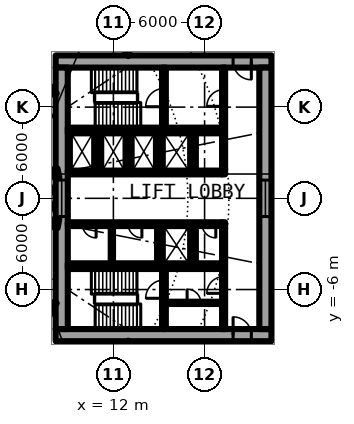
"""IFC4 building model, lengths in metres.
Left out: names, types, materials, properties, quantities, classifications, styles, units other than length and angle.
Written with IfcOpenShell. Run it as: python <this file> out.ifc"""

import sys

from ifc_helpers import new_model, si_unit, direction, frame, frame_2d, origin, origin_2d, place, context, subcontext, project, spatial, rectangle, i_section, extrude, element, fill, save


model = new_model("IFC4")
c1 = context("Model", 3, precision=1e-05, world=origin(), true_north=direction((0.0, 1.0)))
c2 = subcontext(c1, "Body", "Model", "MODEL_VIEW")
j1 = project(units=[si_unit("LENGTHUNIT", "METRE"), si_unit("PLANEANGLEUNIT", "RADIAN")], contexts=[c1])
p1 = place(None, origin())
s1 = spatial("IfcSite", under=j1, at=p1, CompositionType="ELEMENT")
p2 = place(p1, origin())
s2 = spatial("IfcBuilding", under=s1, at=p2, CompositionType="ELEMENT")
p3 = place(p2, frame((0.0, 0.0, 5.4)))
s3 = spatial("IfcBuildingStorey", under=s2, at=p3, CompositionType="ELEMENT", Elevation=5.4)
for number, where, z_axis, x_axis in (
    (1, (8.239, 1.639, 0.0), (0.0, 0.0, 1.0), (0.981, 0.195, 0.0)),
    (2, (8.239, -1.639, 0.0), (0.0, 0.0, 1.0), (0.981, -0.195, 0.0)),
):
    element("IfcColumn", number, at=place(p3, frame(where, z_axis=z_axis, x_axis=x_axis)), inside=s3, PredefinedType="COLUMN", context=c2, shape_type="SweptSolid", body=[
        extrude(i_section(OverallWidth=0.3, OverallDepth=0.6, WebThickness=0.015, FlangeThickness=0.03, FilletRadius=0.027, at=origin_2d()), origin(), (0.0, 0.0, 1.0), 4.2),
    ])
p4 = place(p3, frame((22.4, 9.0, 0.0), z_axis=(0.0, 0.0, 1.0), x_axis=(-1.0, 0.0, 0.0)))
e3 = element("IfcWall", 3, at=p4, inside=s3, PredefinedType="SHEAR", context=c2, shape_type="SweptSolid", body=[
    extrude(rectangle(XDim=14.2, YDim=0.8, at=frame_2d((7.1, 0.0))), origin(), (0.0, 0.0, 1.0), 4.2),
])
p5 = place(p4, frame((1.325, 0.0, 0.0)))
e4 = element("IfcOpeningElement", 4, at=p5, cuts=e3, PredefinedType="OPENING", context=c2, shape_type="SweptSolid", body=[
    extrude(rectangle(XDim=1.2, YDim=2.3, at=frame_2d((0.6, 1.15))), frame((0.0, 0.41, 0.0), z_axis=(0.0, -1.0, 0.0), x_axis=(1.0, 0.0, 0.0)), (0.0, 0.0, 1.0), 0.82),
])
p6 = place(p3, frame((8.2, -9.0, 0.0), z_axis=(0.0, 0.0, 1.0), x_axis=(1.0, 0.0, 0.0)))
e5 = element("IfcWall", 5, at=p6, inside=s3, PredefinedType="SHEAR", context=c2, shape_type="SweptSolid", body=[
    extrude(rectangle(XDim=14.2, YDim=0.8, at=frame_2d((7.1, 0.0))), origin(), (0.0, 0.0, 1.0), 4.2),
])
p7 = place(p6, frame((11.675, 0.0, 0.0)))
e6 = element("IfcOpeningElement", 6, at=p7, cuts=e5, PredefinedType="OPENING", context=c2, shape_type="SweptSolid", body=[
    extrude(rectangle(XDim=1.2, YDim=2.3, at=frame_2d((0.6, 1.15))), frame((0.0, 0.41, 0.0), z_axis=(0.0, -1.0, 0.0), x_axis=(1.0, 0.0, 0.0)), (0.0, 0.0, 1.0), 0.82),
])
p8 = place(p3, frame((22.0, -8.6, 0.0), z_axis=(0.0, 0.0, 1.0), x_axis=(0.0, 1.0, 0.0)))
e7 = element("IfcWall", 7, at=p8, inside=s3, PredefinedType="SHEAR", context=c2, shape_type="SweptSolid", body=[
    extrude(rectangle(XDim=17.2, YDim=0.8, at=frame_2d((8.6, 0.0))), origin(), (0.0, 0.0, 1.0), 4.2),
])
p9 = place(p8, frame((7.4, 0.0, 0.1)))
e8 = element("IfcOpeningElement", 8, at=p9, cuts=e7, PredefinedType="OPENING", context=c2, shape_type="SweptSolid", body=[
    extrude(rectangle(XDim=2.4, YDim=2.2, at=frame_2d((1.2, 1.1))), frame((0.0, 0.41, 0.0), z_axis=(0.0, -1.0, 0.0), x_axis=(1.0, 0.0, 0.0)), (0.0, 0.0, 1.0), 0.82),
])
p10 = place(p3, frame((8.6, -8.6, 0.0), z_axis=(0.0, 0.0, 1.0), x_axis=(0.0, 1.0, 0.0)))
e9 = element("IfcWall", 9, at=p10, inside=s3, PredefinedType="SHEAR", context=c2, shape_type="SweptSolid", body=[
    extrude(rectangle(XDim=17.2, YDim=0.8, at=frame_2d((8.6, 0.0))), origin(), (0.0, 0.0, 1.0), 4.2),
])
p11 = place(p10, frame((7.4, 0.0, 0.1)))
e10 = element("IfcOpeningElement", 10, at=p11, cuts=e9, PredefinedType="OPENING", context=c2, shape_type="SweptSolid", body=[
    extrude(rectangle(XDim=2.4, YDim=2.2, at=frame_2d((1.2, 1.1))), frame((0.0, 0.41, 0.0), z_axis=(0.0, -1.0, 0.0), x_axis=(1.0, 0.0, 0.0)), (0.0, 0.0, 1.0), 0.82),
])
p12 = place(p3, frame((9.0, 1.7, 0.0), z_axis=(0.0, 0.0, 1.0), x_axis=(1.0, 0.0, 0.0)))
e11 = element("IfcWall", 11, at=p12, inside=s3, PredefinedType="SHEAR", context=c2, shape_type="SweptSolid", body=[
    extrude(rectangle(XDim=10.15, YDim=0.25, at=frame_2d((5.075, 0.0))), origin(), (0.0, 0.0, 1.0), 4.2),
])
p13 = place(p12, frame((0.387, 0.0, 0.0)))
e12 = element("IfcOpeningElement", 12, at=p13, cuts=e11, PredefinedType="OPENING", context=c2, shape_type="SweptSolid", body=[
    extrude(rectangle(XDim=1.1, YDim=2.3, at=frame_2d((0.55, 1.15))), frame((0.0, 0.135, 0.0), z_axis=(0.0, -1.0, 0.0), x_axis=(1.0, 0.0, 0.0)), (0.0, 0.0, 1.0), 0.27),
])
p14 = place(p12, frame((2.45, 0.0, 0.0)))
e13 = element("IfcOpeningElement", 13, at=p14, cuts=e11, PredefinedType="OPENING", context=c2, shape_type="SweptSolid", body=[
    extrude(rectangle(XDim=1.1, YDim=2.3, at=frame_2d((0.55, 1.15))), frame((0.0, 0.135, 0.0), z_axis=(0.0, -1.0, 0.0), x_axis=(1.0, 0.0, 0.0)), (0.0, 0.0, 1.0), 0.27),
])
p15 = place(p12, frame((4.45, 0.0, 0.0)))
e14 = element("IfcOpeningElement", 14, at=p15, cuts=e11, PredefinedType="OPENING", context=c2, shape_type="SweptSolid", body=[
    extrude(rectangle(XDim=1.1, YDim=2.3, at=frame_2d((0.55, 1.15))), frame((0.0, 0.135, 0.0), z_axis=(0.0, -1.0, 0.0), x_axis=(1.0, 0.0, 0.0)), (0.0, 0.0, 1.0), 0.27),
])
p16 = place(p3, frame((9.0, 4.462, 0.0), z_axis=(0.0, 0.0, 1.0), x_axis=(1.0, 0.0, 0.0)))
e15 = element("IfcWall", 15, at=p16, inside=s3, PredefinedType="SHEAR", context=c2, shape_type="SweptSolid", body=[
    extrude(rectangle(XDim=10.15, YDim=0.375, at=frame_2d((5.075, 0.0))), origin(), (0.0, 0.0, 1.0), 4.2),
])
p17 = place(p16, frame((6.6, 0.0, 0.0)))
e16 = element("IfcOpeningElement", 16, at=p17, cuts=e15, PredefinedType="OPENING", context=c2, shape_type="SweptSolid", body=[
    extrude(rectangle(XDim=1.1, YDim=2.3, at=frame_2d((0.55, 1.15))), frame((0.0, 0.198, 0.0), z_axis=(0.0, -1.0, 0.0), x_axis=(1.0, 0.0, 0.0)), (0.0, 0.0, 1.0), 0.395),
])
p18 = place(p3, frame((15.325, 4.65, 0.0), z_axis=(0.0, 0.0, 1.0), x_axis=(0.0, 1.0, 0.0)))
e17 = element("IfcWall", 17, at=p18, inside=s3, PredefinedType="SHEAR", context=c2, shape_type="SweptSolid", body=[
    extrude(rectangle(XDim=3.95, YDim=0.25, at=frame_2d((1.975, 0.0))), origin(), (0.0, 0.0, 1.0), 4.2),
])
p19 = place(p18, frame((1.375, 0.0, 0.0)))
e18 = element("IfcOpeningElement", 18, at=p19, cuts=e17, PredefinedType="OPENING", context=c2, shape_type="SweptSolid", body=[
    extrude(rectangle(XDim=1.2, YDim=2.3, at=frame_2d((0.6, 1.15))), frame((0.0, 0.135, 0.0), z_axis=(0.0, -1.0, 0.0), x_axis=(1.0, 0.0, 0.0)), (0.0, 0.0, 1.0), 0.27),
])
for number, where, z_axis, x_axis in (
    (19, (15.0, 1.825, 0.0), (0.0, 0.0, 1.0), (0.0, 1.0, 0.0)),
    (20, (17.3, 1.825, 0.0), (0.0, 0.0, 1.0), (0.0, 1.0, 0.0)),
):
    element("IfcWall", number, at=place(p3, frame(where, z_axis=z_axis, x_axis=x_axis)), inside=s3, PredefinedType="SOLIDWALL", context=c2, shape_type="SweptSolid", body=[
        extrude(rectangle(XDim=2.45, YDim=0.25, at=frame_2d((1.225, 0.0))), origin(), (0.0, 0.0, 1.0), 3.7),
    ])
p20 = place(p3, frame((19.25, 1.575, 0.0), z_axis=(0.0, 0.0, 1.0), x_axis=(0.0, 1.0, 0.0)))
e21 = element("IfcWall", 21, at=p20, inside=s3, PredefinedType="SOLIDWALL", context=c2, shape_type="SweptSolid", body=[
    extrude(rectangle(XDim=7.025, YDim=0.2, at=frame_2d((3.513, 0.0))), origin(), (0.0, 0.0, 1.0), 3.7),
])
p21 = place(p20, frame((4.475, 0.0, 0.0)))
e22 = element("IfcOpeningElement", 22, at=p21, cuts=e21, PredefinedType="OPENING", context=c2, shape_type="SweptSolid", body=[
    extrude(rectangle(XDim=1.1, YDim=2.3, at=frame_2d((0.55, 1.15))), frame((0.0, 0.11, 0.0), z_axis=(0.0, -1.0, 0.0), x_axis=(1.0, 0.0, 0.0)), (0.0, 0.0, 1.0), 0.22),
])
p22 = place(p3, frame((19.15, -1.7, 0.0), z_axis=(0.0, 0.0, 1.0), x_axis=(-1.0, 0.0, 0.0)))
e23 = element("IfcWall", 23, at=p22, inside=s3, PredefinedType="SHEAR", context=c2, shape_type="SweptSolid", body=[
    extrude(rectangle(XDim=10.15, YDim=0.25, at=frame_2d((5.075, 0.0))), origin(), (0.0, 0.0, 1.0), 4.2),
])
p23 = place(p22, frame((2.45, 0.0, 0.0)))
e24 = element("IfcOpeningElement", 24, at=p23, cuts=e23, PredefinedType="OPENING", context=c2, shape_type="SweptSolid", body=[
    extrude(rectangle(XDim=1.1, YDim=2.3, at=frame_2d((0.55, 1.15))), frame((0.0, 0.135, 0.0), z_axis=(0.0, -1.0, 0.0), x_axis=(1.0, 0.0, 0.0)), (0.0, 0.0, 1.0), 0.27),
])
p24 = place(p22, frame((8.288, 0.0, 0.0)))
e25 = element("IfcOpeningElement", 25, at=p24, cuts=e23, PredefinedType="OPENING", context=c2, shape_type="SweptSolid", body=[
    extrude(rectangle(XDim=0.9, YDim=2.3, at=frame_2d((0.45, 1.15))), frame((0.0, 0.135, 0.0), z_axis=(0.0, -1.0, 0.0), x_axis=(1.0, 0.0, 0.0)), (0.0, 0.0, 1.0), 0.27),
])
p25 = place(p22, frame((5.275, 0.0, 0.0)))
e26 = element("IfcOpeningElement", 26, at=p25, cuts=e23, PredefinedType="OPENING", context=c2, shape_type="SweptSolid", body=[
    extrude(rectangle(XDim=0.9, YDim=2.3, at=frame_2d((0.45, 1.15))), frame((0.0, 0.135, 0.0), z_axis=(0.0, -1.0, 0.0), x_axis=(1.0, 0.0, 0.0)), (0.0, 0.0, 1.0), 0.27),
])
p26 = place(p22, frame((0.413, 0.0, 0.0)))
e27 = element("IfcOpeningElement", 27, at=p26, cuts=e23, PredefinedType="OPENING", context=c2, shape_type="SweptSolid", body=[
    extrude(rectangle(XDim=0.9, YDim=2.3, at=frame_2d((0.45, 1.15))), frame((0.0, 0.135, 0.0), z_axis=(0.0, -1.0, 0.0), x_axis=(1.0, 0.0, 0.0)), (0.0, 0.0, 1.0), 0.27),
])
p27 = place(p3, frame((9.0, -4.462, 0.0), z_axis=(0.0, 0.0, 1.0), x_axis=(1.0, 0.0, 0.0)))
e28 = element("IfcWall", 28, at=p27, inside=s3, PredefinedType="SHEAR", context=c2, shape_type="SweptSolid", body=[
    extrude(rectangle(XDim=10.15, YDim=0.375, at=frame_2d((5.075, 0.0))), origin(), (0.0, 0.0, 1.0), 4.2),
])
p28 = place(p3, frame((15.325, -8.6, 0.0), z_axis=(0.0, 0.0, 1.0), x_axis=(0.0, 1.0, 0.0)))
e29 = element("IfcWall", 29, at=p28, inside=s3, PredefinedType="SHEAR", context=c2, shape_type="SweptSolid", body=[
    extrude(rectangle(XDim=3.95, YDim=0.25, at=frame_2d((1.975, 0.0))), origin(), (0.0, 0.0, 1.0), 4.2),
])
p29 = place(p28, frame((2.025, 0.0, 0.0)))
e30 = element("IfcOpeningElement", 30, at=p29, cuts=e29, PredefinedType="OPENING", context=c2, shape_type="SweptSolid", body=[
    extrude(rectangle(XDim=1.2, YDim=2.3, at=frame_2d((0.6, 1.15))), frame((0.0, 0.135, 0.0), z_axis=(0.0, -1.0, 0.0), x_axis=(1.0, 0.0, 0.0)), (0.0, 0.0, 1.0), 0.27),
])
for number, where, z_axis, x_axis in (
    (31, (15.0, -1.825, 0.0), (0.0, 0.0, 1.0), (0.0, -1.0, 0.0)),
    (32, (17.3, -1.825, 0.0), (0.0, 0.0, 1.0), (0.0, -1.0, 0.0)),
):
    element("IfcWall", number, at=place(p3, frame(where, z_axis=z_axis, x_axis=x_axis)), inside=s3, PredefinedType="SOLIDWALL", context=c2, shape_type="SweptSolid", body=[
        extrude(rectangle(XDim=2.45, YDim=0.25, at=frame_2d((1.225, 0.0))), origin(), (0.0, 0.0, 1.0), 3.7),
    ])
p30 = place(p3, frame((19.25, -8.6, 0.0), z_axis=(0.0, 0.0, 1.0), x_axis=(0.0, 1.0, 0.0)))
e33 = element("IfcWall", 33, at=p30, inside=s3, PredefinedType="SOLIDWALL", context=c2, shape_type="SweptSolid", body=[
    extrude(rectangle(XDim=7.025, YDim=0.2, at=frame_2d((3.513, 0.0))), origin(), (0.0, 0.0, 1.0), 3.7),
])
p31 = place(p30, frame((2.35, 0.0, 0.0)))
e34 = element("IfcOpeningElement", 34, at=p31, cuts=e33, PredefinedType="OPENING", context=c2, shape_type="SweptSolid", body=[
    extrude(rectangle(XDim=1.1, YDim=2.3, at=frame_2d((0.55, 1.15))), frame((0.0, 0.11, 0.0), z_axis=(0.0, -1.0, 0.0), x_axis=(1.0, 0.0, 0.0)), (0.0, 0.0, 1.0), 0.22),
])
for number, where, z_axis, x_axis in (
    (35, (11.0, 1.825, 0.0), (0.0, 0.0, 1.0), (0.0, 1.0, 0.0)),
    (36, (13.0, 1.825, 0.0), (0.0, 0.0, 1.0), (0.0, 1.0, 0.0)),
):
    element("IfcWall", number, at=place(p3, frame(where, z_axis=z_axis, x_axis=x_axis)), inside=s3, PredefinedType="SOLIDWALL", context=c2, shape_type="SweptSolid", body=[
        extrude(rectangle(XDim=2.45, YDim=0.25, at=frame_2d((1.225, 0.0))), origin(), (0.0, 0.0, 1.0), 3.7),
    ])
p32 = place(p3, frame((11.9, -1.825, 0.0), z_axis=(0.0, 0.0, 1.0), x_axis=(0.0, -1.0, 0.0)))
e37 = element("IfcWall", 37, at=p32, inside=s3, PredefinedType="PARTITIONING", context=c2, shape_type="SweptSolid", body=[
    extrude(rectangle(XDim=2.45, YDim=0.15, at=frame_2d((1.225, 0.0))), origin(), (0.0, 0.0, 1.0), 3.7),
])
p33 = place(p3, frame((15.45, -6.875, 0.0), z_axis=(0.0, 0.0, 1.0), x_axis=(1.0, 0.0, 0.0)))
e38 = element("IfcWall", 38, at=p33, inside=s3, PredefinedType="PARTITIONING", context=c2, shape_type="SweptSolid", body=[
    extrude(rectangle(XDim=3.7, YDim=0.15, at=frame_2d((1.85, 0.0))), origin(), (0.0, 0.0, 1.0), 3.7),
])
p34 = place(p33, frame((1.4, 0.0, 0.0)))
e39 = element("IfcOpeningElement", 39, at=p34, cuts=e38, PredefinedType="OPENING", context=c2, shape_type="SweptSolid", body=[
    extrude(rectangle(XDim=0.9, YDim=2.3, at=frame_2d((0.45, 1.15))), frame((0.0, 0.085, 0.0), z_axis=(0.0, -1.0, 0.0), x_axis=(1.0, 0.0, 0.0)), (0.0, 0.0, 1.0), 0.17),
])
p35 = place(p3, frame((12.773, -9.801, 0.0), z_axis=(0.0, 0.0, 1.0), x_axis=(0.555634077892, 0.831426948977, 0.0)))
e40 = element("IfcWall", 40, at=p35, inside=s3, PredefinedType="PARTITIONING", context=c2, shape_type="SweptSolid", body=[
    extrude(rectangle(XDim=0.482, YDim=0.15, at=frame_2d((0.241, 0.0))), origin(), (0.0, 0.0, 1.0), 3.7),
])
p36 = place(p3, frame((7.566, -7.566, 0.0), z_axis=(0.0, 0.0, 1.0), x_axis=(0.659384951594, 0.751805483893, 0.0)))
e41 = element("IfcWall", 41, at=p36, inside=s3, PredefinedType="PARTITIONING", context=c2, shape_type="SweptSolid", body=[
    extrude(rectangle(XDim=0.962, YDim=0.2, at=frame_2d((0.481, 0.0))), origin(), (0.0, 0.0, 1.0), 3.7),
])
p37 = place(p3, frame((5.347, -9.268, 0.0), z_axis=(0.0, 0.0, 1.0), x_axis=(0.499989858664, -0.866031258808, 0.0)))
e42 = element("IfcWall", 42, at=p37, inside=s3, PredefinedType="PARTITIONING", context=c2, shape_type="SweptSolid", body=[
    extrude(rectangle(XDim=5.4, YDim=0.1, at=frame_2d((2.7, 0.0))), origin(), (0.0, 0.0, 1.0), 3.7),
])
p38 = place(p3, frame((6.516, 8.488, 0.0), z_axis=(0.0, 0.0, 1.0), x_axis=(0.608610950977, 0.793468783476, 0.0)))
e43 = element("IfcWall", 43, at=p38, inside=s3, PredefinedType="PARTITIONING", context=c2, shape_type="SweptSolid", body=[
    extrude(rectangle(XDim=5.399, YDim=0.15, at=frame_2d((2.699, 0.0))), origin(), (0.0, 0.0, 1.0), 3.7),
])
p39 = place(p3, frame((7.566, 7.566, 0.0), z_axis=(0.0, 0.0, 1.0), x_axis=(0.659384951594, -0.751805483893, 0.0)))
e44 = element("IfcWall", 44, at=p39, inside=s3, PredefinedType="PARTITIONING", context=c2, shape_type="SweptSolid", body=[
    extrude(rectangle(XDim=0.962, YDim=0.2, at=frame_2d((0.481, 0.0))), origin(), (0.0, 0.0, 1.0), 3.7),
])
p40 = place(p3, frame((12.773, 9.801, 0.0), z_axis=(0.0, 0.0, 1.0), x_axis=(0.555634077892, -0.831426948977, 0.0)))
e45 = element("IfcWall", 45, at=p40, inside=s3, PredefinedType="PARTITIONING", context=c2, shape_type="SweptSolid", body=[
    extrude(rectangle(XDim=0.482, YDim=0.15, at=frame_2d((0.241, 0.0))), origin(), (0.0, 0.0, 1.0), 3.7),
])
p41 = place(p13, origin())
e46 = element("IfcDoor", 46, at=p41, inside=s3, OperationType="DOUBLE_DOOR_SLIDING", PredefinedType="DOOR", context=c2, shape_type="SweptSolid", body=[
    extrude(rectangle(XDim=1.1, YDim=2.3, at=frame_2d((0.55, 1.15))), frame((0.0, 0.025, 0.0), z_axis=(0.0, -1.0, 0.0), x_axis=(1.0, 0.0, 0.0)), (0.0, 0.0, 1.0), 0.05),
])
fill(e12, e46)
p42 = place(p14, origin())
e47 = element("IfcDoor", 47, at=p42, inside=s3, OperationType="DOUBLE_DOOR_SLIDING", PredefinedType="DOOR", context=c2, shape_type="SweptSolid", body=[
    extrude(rectangle(XDim=1.1, YDim=2.3, at=frame_2d((0.55, 1.15))), frame((0.0, 0.025, 0.0), z_axis=(0.0, -1.0, 0.0), x_axis=(1.0, 0.0, 0.0)), (0.0, 0.0, 1.0), 0.05),
])
fill(e13, e47)
p43 = place(p15, origin())
e48 = element("IfcDoor", 48, at=p43, inside=s3, OperationType="DOUBLE_DOOR_SLIDING", PredefinedType="DOOR", context=c2, shape_type="SweptSolid", body=[
    extrude(rectangle(XDim=1.1, YDim=2.3, at=frame_2d((0.55, 1.15))), frame((0.0, 0.025, 0.0), z_axis=(0.0, -1.0, 0.0), x_axis=(1.0, 0.0, 0.0)), (0.0, 0.0, 1.0), 0.05),
])
fill(e14, e48)
p44 = place(p17, origin())
e49 = element("IfcDoor", 49, at=p44, inside=s3, OperationType="DOUBLE_DOOR_SLIDING", PredefinedType="DOOR", context=c2, shape_type="SweptSolid", body=[
    extrude(rectangle(XDim=1.1, YDim=2.3, at=frame_2d((0.55, 1.15))), frame((0.0, 0.025, 0.0), z_axis=(0.0, -1.0, 0.0), x_axis=(1.0, 0.0, 0.0)), (0.0, 0.0, 1.0), 0.05),
])
fill(e16, e49)
p45 = place(p23, origin())
e50 = element("IfcDoor", 50, at=p45, inside=s3, OperationType="DOUBLE_DOOR_SLIDING", PredefinedType="DOOR", context=c2, shape_type="SweptSolid", body=[
    extrude(rectangle(XDim=1.1, YDim=2.3, at=frame_2d((0.55, 1.15))), frame((0.0, 0.025, 0.0), z_axis=(0.0, -1.0, 0.0), x_axis=(1.0, 0.0, 0.0)), (0.0, 0.0, 1.0), 0.05),
])
fill(e24, e50)
p46 = place(p24, origin())
e51 = element("IfcDoor", 51, at=p46, inside=s3, OperationType="SINGLE_SWING_LEFT", PredefinedType="DOOR", context=c2, shape_type="SweptSolid", body=[
    extrude(rectangle(XDim=0.9, YDim=2.3, at=frame_2d((0.45, 1.15))), frame((0.0, 0.025, 0.0), z_axis=(0.0, -1.0, 0.0), x_axis=(1.0, 0.0, 0.0)), (0.0, 0.0, 1.0), 0.05),
])
fill(e25, e51)
p47 = place(p25, origin())
e52 = element("IfcDoor", 52, at=p47, inside=s3, OperationType="SINGLE_SWING_LEFT", PredefinedType="DOOR", context=c2, shape_type="SweptSolid", body=[
    extrude(rectangle(XDim=0.9, YDim=2.3, at=frame_2d((0.45, 1.15))), frame((0.0, 0.025, 0.0), z_axis=(0.0, -1.0, 0.0), x_axis=(1.0, 0.0, 0.0)), (0.0, 0.0, 1.0), 0.05),
])
fill(e26, e52)
p48 = place(p26, origin())
e53 = element("IfcDoor", 53, at=p48, inside=s3, OperationType="SINGLE_SWING_RIGHT", PredefinedType="DOOR", context=c2, shape_type="SweptSolid", body=[
    extrude(rectangle(XDim=0.9, YDim=2.3, at=frame_2d((0.45, 1.15))), frame((0.0, 0.025, 0.0), z_axis=(0.0, -1.0, 0.0), x_axis=(1.0, 0.0, 0.0)), (0.0, 0.0, 1.0), 0.05),
])
fill(e27, e53)
p49 = place(p34, origin())
e54 = element("IfcDoor", 54, at=p49, inside=s3, OperationType="SINGLE_SWING_LEFT", PredefinedType="DOOR", context=c2, shape_type="SweptSolid", body=[
    extrude(rectangle(XDim=0.9, YDim=2.3, at=frame_2d((0.45, 1.15))), frame((0.0, 0.025, 0.0), z_axis=(0.0, -1.0, 0.0), x_axis=(1.0, 0.0, 0.0)), (0.0, 0.0, 1.0), 0.05),
])
fill(e39, e54)
p50 = place(p19, origin())
e55 = element("IfcDoor", 55, at=p50, inside=s3, OperationType="SINGLE_SWING_LEFT", PredefinedType="DOOR", context=c2, shape_type="SweptSolid", body=[
    extrude(rectangle(XDim=1.2, YDim=2.3, at=frame_2d((0.6, 1.15))), frame((0.0, 0.025, 0.0), z_axis=(0.0, -1.0, 0.0), x_axis=(1.0, 0.0, 0.0)), (0.0, 0.0, 1.0), 0.05),
])
fill(e18, e55)
p51 = place(p29, origin())
e56 = element("IfcDoor", 56, at=p51, inside=s3, OperationType="SINGLE_SWING_LEFT", PredefinedType="DOOR", context=c2, shape_type="SweptSolid", body=[
    extrude(rectangle(XDim=1.2, YDim=2.3, at=frame_2d((0.6, 1.15))), frame((0.0, 0.025, 0.0), z_axis=(0.0, -1.0, 0.0), x_axis=(1.0, 0.0, 0.0)), (0.0, 0.0, 1.0), 0.05),
])
fill(e30, e56)
p52 = place(p21, origin())
e57 = element("IfcDoor", 57, at=p52, inside=s3, OperationType="SINGLE_SWING_LEFT", PredefinedType="DOOR", context=c2, shape_type="SweptSolid", body=[
    extrude(rectangle(XDim=1.1, YDim=2.3, at=frame_2d((0.55, 1.15))), frame((0.0, 0.025, 0.0), z_axis=(0.0, -1.0, 0.0), x_axis=(1.0, 0.0, 0.0)), (0.0, 0.0, 1.0), 0.05),
])
fill(e22, e57)
p53 = place(p31, origin())
e58 = element("IfcDoor", 58, at=p53, inside=s3, OperationType="SINGLE_SWING_RIGHT", PredefinedType="DOOR", context=c2, shape_type="SweptSolid", body=[
    extrude(rectangle(XDim=1.1, YDim=2.3, at=frame_2d((0.55, 1.15))), frame((0.0, 0.025, 0.0), z_axis=(0.0, -1.0, 0.0), x_axis=(1.0, 0.0, 0.0)), (0.0, 0.0, 1.0), 0.05),
])
fill(e34, e58)
p54 = place(p5, origin())
e59 = element("IfcDoor", 59, at=p54, inside=s3, OperationType="SINGLE_SWING_RIGHT", PredefinedType="DOOR", context=c2, shape_type="SweptSolid", body=[
    extrude(rectangle(XDim=1.2, YDim=2.3, at=frame_2d((0.6, 1.15))), frame((0.0, 0.025, 0.0), z_axis=(0.0, -1.0, 0.0), x_axis=(1.0, 0.0, 0.0)), (0.0, 0.0, 1.0), 0.05),
])
fill(e4, e59)
p55 = place(p7, origin())
e60 = element("IfcDoor", 60, at=p55, inside=s3, OperationType="SINGLE_SWING_LEFT", PredefinedType="DOOR", context=c2, shape_type="SweptSolid", body=[
    extrude(rectangle(XDim=1.2, YDim=2.3, at=frame_2d((0.6, 1.15))), frame((0.0, 0.025, 0.0), z_axis=(0.0, -1.0, 0.0), x_axis=(1.0, 0.0, 0.0)), (0.0, 0.0, 1.0), 0.05),
])
fill(e6, e60)
p56 = place(p11, origin())
e61 = element("IfcWindow", 61, at=p56, inside=s3, PartitioningType="SINGLE_PANEL", PredefinedType="WINDOW", context=c2, shape_type="SweptSolid", body=[
    extrude(rectangle(XDim=2.4, YDim=2.2, at=frame_2d((1.2, 1.1))), frame((0.0, 0.03, 0.0), z_axis=(0.0, -1.0, 0.0), x_axis=(1.0, 0.0, 0.0)), (0.0, 0.0, 1.0), 0.06),
])
fill(e10, e61)
p57 = place(p9, origin())
e62 = element("IfcWindow", 62, at=p57, inside=s3, PartitioningType="SINGLE_PANEL", PredefinedType="WINDOW", context=c2, shape_type="SweptSolid", body=[
    extrude(rectangle(XDim=2.4, YDim=2.2, at=frame_2d((1.2, 1.1))), frame((0.0, 0.03, 0.0), z_axis=(0.0, -1.0, 0.0), x_axis=(1.0, 0.0, 0.0)), (0.0, 0.0, 1.0), 0.06),
])
fill(e8, e62)
save(model, sys.argv[1])
